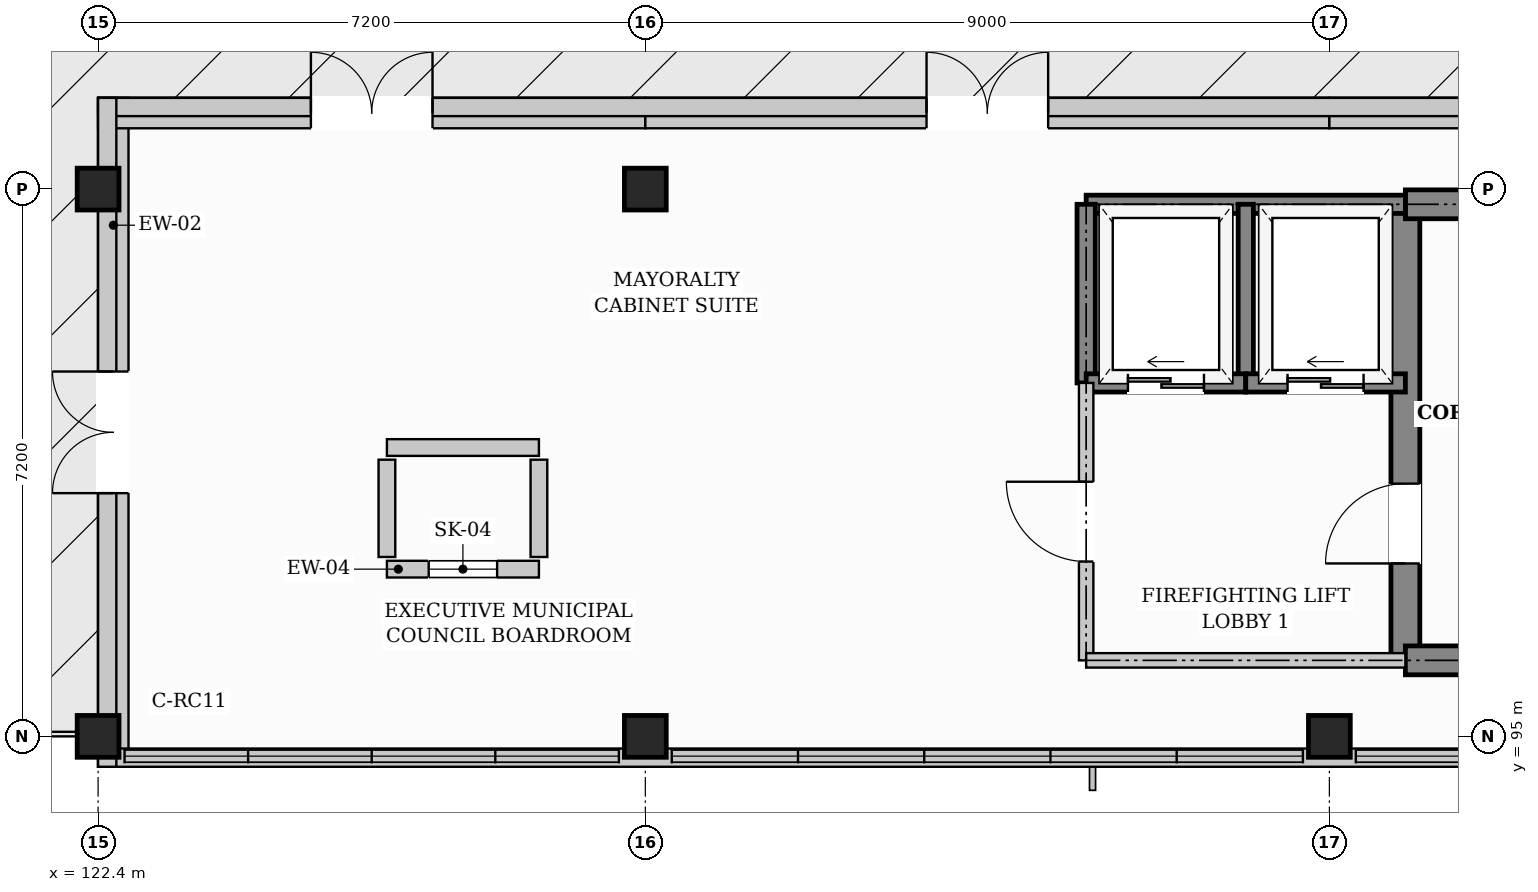
"""IFC4 building model, lengths in metres.
Left out: names, types, materials, properties, quantities, classifications, styles, units other than length and angle.
Written with IfcOpenShell. Run it as: python <this file> out.ifc"""

import sys

from ifc_helpers import new_model, si_unit, direction, frame, frame_2d, origin, origin_2d, place, context, subcontext, project, spatial, rectangle, extrude, element, fill, save


model = new_model("IFC4")
c1 = context("Model", 3, precision=1e-05, world=origin(), true_north=direction((0.0, 1.0)))
c2 = subcontext(c1, "Body", "Model", "MODEL_VIEW")
j1 = project(units=[si_unit("LENGTHUNIT", "METRE"), si_unit("PLANEANGLEUNIT", "RADIAN")], contexts=[c1])
p1 = place(None, origin())
s1 = spatial("IfcSite", under=j1, at=p1, CompositionType="ELEMENT")
p2 = place(p1, origin())
s2 = spatial("IfcBuilding", under=s1, at=p2, CompositionType="ELEMENT")
p3 = place(p2, frame((0.0, 0.0, 27.6)))
s3 = spatial("IfcBuildingStorey", under=s2, at=p3, CompositionType="ELEMENT", Elevation=27.6)
for number, where, z_axis, x_axis in (
    (1, (122.4, 95.0, 0.0), (0.0, 0.0, 1.0), (1.0, 0.0, 0.0)),
    (2, (122.4, 102.2, 0.0), (0.0, 0.0, 1.0), (1.0, 0.0, 0.0)),
    (3, (129.6, 95.0, 0.0), (0.0, 0.0, 1.0), (1.0, 0.0, 0.0)),
    (4, (129.6, 102.2, 0.0), (0.0, 0.0, 1.0), (1.0, 0.0, 0.0)),
    (5, (138.6, 95.0, 0.0), (0.0, 0.0, 1.0), (1.0, 0.0, 0.0)),
):
    element("IfcColumn", number, at=place(p3, frame(where, z_axis=z_axis, x_axis=x_axis)), inside=s3, PredefinedType="COLUMN", context=c2, shape_type="SweptSolid", body=[
        extrude(rectangle(XDim=0.55, YDim=0.55, at=origin_2d()), origin(), (0.0, 0.0, 1.0), 3.6),
    ])
p4 = place(p3, frame((122.6, 94.6, 0.0), z_axis=(0.0, 0.0, 1.0), x_axis=(0.0, 1.0, 0.0)))
e6 = element("IfcWall", 6, at=p4, inside=s3, PredefinedType="SOLIDWALL", context=c2, shape_type="SweptSolid", body=[
    extrude(rectangle(XDim=8.8, YDim=0.4, at=frame_2d((4.4, 0.0))), origin(), (0.0, 0.0, 1.0), 2.78),
])
p5 = place(p4, frame((3.6, 0.0, 0.0)))
e7 = element("IfcOpeningElement", 7, at=p5, cuts=e6, PredefinedType="OPENING", context=c2, shape_type="SweptSolid", body=[
    extrude(rectangle(XDim=1.6, YDim=2.25, at=frame_2d((0.8, 1.125))), frame((0.0, 0.21, 0.0), z_axis=(0.0, -1.0, 0.0), x_axis=(1.0, 0.0, 0.0)), (0.0, 0.0, 1.0), 0.42),
])
p6 = place(p3, frame((122.4, 103.2, 0.0), z_axis=(0.0, 0.0, 1.0), x_axis=(1.0, 0.0, 0.0)))
e8 = element("IfcWall", 8, at=p6, inside=s3, PredefinedType="SOLIDWALL", context=c2, shape_type="SweptSolid", body=[
    extrude(rectangle(XDim=7.2, YDim=0.4, at=frame_2d((3.6, 0.0))), origin(), (0.0, 0.0, 1.0), 3.34),
])
p7 = place(p6, frame((2.8, 0.0, 0.0)))
e9 = element("IfcOpeningElement", 9, at=p7, cuts=e8, PredefinedType="OPENING", context=c2, shape_type="SweptSolid", body=[
    extrude(rectangle(XDim=1.6, YDim=2.25, at=frame_2d((0.8, 1.125))), frame((0.0, 0.21, 0.0), z_axis=(0.0, -1.0, 0.0), x_axis=(1.0, 0.0, 0.0)), (0.0, 0.0, 1.0), 0.42),
])
p8 = place(p3, frame((129.6, 103.2, 0.0), z_axis=(0.0, 0.0, 1.0), x_axis=(1.0, 0.0, 0.0)))
e10 = element("IfcWall", 10, at=p8, inside=s3, PredefinedType="SOLIDWALL", context=c2, shape_type="SweptSolid", body=[
    extrude(rectangle(XDim=9.0, YDim=0.4, at=frame_2d((4.5, 0.0))), origin(), (0.0, 0.0, 1.0), 3.34),
])
p9 = place(p8, frame((3.7, 0.0, 0.0)))
e11 = element("IfcOpeningElement", 11, at=p9, cuts=e10, PredefinedType="OPENING", context=c2, shape_type="SweptSolid", body=[
    extrude(rectangle(XDim=1.6, YDim=2.25, at=frame_2d((0.8, 1.125))), frame((0.0, 0.21, 0.0), z_axis=(0.0, -1.0, 0.0), x_axis=(1.0, 0.0, 0.0)), (0.0, 0.0, 1.0), 0.42),
])
p10 = place(p3, frame((138.6, 103.2, 0.0), z_axis=(0.0, 0.0, 1.0), x_axis=(1.0, 0.0, 0.0)))
e12 = element("IfcWall", 12, at=p10, inside=s3, PredefinedType="SOLIDWALL", context=c2, shape_type="SweptSolid", body=[
    extrude(rectangle(XDim=9.0, YDim=0.4, at=frame_2d((4.5, 0.0))), origin(), (0.0, 0.0, 1.0), 3.34),
])
p11 = place(p10, frame((3.7, 0.0, 0.0)))
e13 = element("IfcOpeningElement", 13, at=p11, cuts=e12, PredefinedType="OPENING", context=c2, shape_type="SweptSolid", body=[
    extrude(rectangle(XDim=1.6, YDim=2.25, at=frame_2d((0.8, 1.125))), frame((0.0, 0.21, 0.0), z_axis=(0.0, -1.0, 0.0), x_axis=(1.0, 0.0, 0.0)), (0.0, 0.0, 1.0), 0.42),
])
p12 = place(p3, frame((122.4, 94.72, 3.6), z_axis=(0.0, 0.0, 1.0), x_axis=(1.0, 0.0, 0.0)))
e14 = element("IfcWall", 14, at=p12, inside=s3, PredefinedType="PARAPET", context=c2, shape_type="SweptSolid", body=[
    extrude(rectangle(XDim=25.6, YDim=0.24, at=frame_2d((12.8, 0.0))), origin(), (0.0, 0.0, 1.0), 1.15),
])
p13 = place(p3, frame((154.8, 103.28, 3.6), z_axis=(0.0, 0.0, 1.0), x_axis=(-1.0, 0.0, 0.0)))
e15 = element("IfcWall", 15, at=p13, inside=s3, PredefinedType="PARAPET", context=c2, shape_type="SweptSolid", body=[
    extrude(rectangle(XDim=32.4, YDim=0.24, at=frame_2d((16.2, 0.0))), origin(), (0.0, 0.0, 1.0), 1.15),
])
p14 = place(p3, frame((122.52, 103.4, 3.6), z_axis=(0.0, 0.0, 1.0), x_axis=(0.0, -1.0, 0.0)))
e16 = element("IfcWall", 16, at=p14, inside=s3, PredefinedType="PARAPET", context=c2, shape_type="SweptSolid", body=[
    extrude(rectangle(XDim=8.8, YDim=0.24, at=frame_2d((4.4, 0.0))), origin(), (0.0, 0.0, 1.0), 1.15),
])
p15 = place(p3, frame((126.2, 97.2, 3.58), z_axis=(0.0, 0.0, 1.0), x_axis=(1.0, 0.0, 0.0)))
e17 = element("IfcWall", 17, at=p15, inside=s3, PredefinedType="SOLIDWALL", context=c2, shape_type="SweptSolid", body=[
    extrude(rectangle(XDim=2.0, YDim=0.22, at=frame_2d((1.0, 0.0))), origin(), (0.0, 0.0, 1.0), 1.18),
])
p16 = place(p15, frame((0.55, 0.0, 0.28)))
e18 = element("IfcOpeningElement", 18, at=p16, cuts=e17, PredefinedType="OPENING", context=c2, shape_type="SweptSolid", body=[
    extrude(rectangle(XDim=0.9, YDim=0.65, at=frame_2d((0.45, 0.325))), frame((0.0, 0.12, 0.0), z_axis=(0.0, -1.0, 0.0), x_axis=(1.0, 0.0, 0.0)), (0.0, 0.0, 1.0), 0.24),
])
p17 = place(p3, frame((126.2, 98.8, 3.58), z_axis=(0.0, 0.0, 1.0), x_axis=(1.0, 0.0, 0.0)))
e19 = element("IfcWall", 19, at=p17, inside=s3, PredefinedType="SOLIDWALL", context=c2, shape_type="SweptSolid", body=[
    extrude(rectangle(XDim=2.0, YDim=0.22, at=frame_2d((1.0, 0.0))), origin(), (0.0, 0.0, 1.0), 1.18),
])
for number, where, z_axis, x_axis in (
    (20, (126.2, 97.36, 3.58), (0.0, 0.0, 1.0), (0.0, 1.0, 0.0)),
    (21, (128.2, 97.36, 3.58), (0.0, 0.0, 1.0), (0.0, 1.0, 0.0)),
):
    element("IfcWall", number, at=place(p3, frame(where, z_axis=z_axis, x_axis=x_axis)), inside=s3, PredefinedType="SOLIDWALL", context=c2, shape_type="SweptSolid", body=[
        extrude(rectangle(XDim=1.28, YDim=0.22, at=frame_2d((0.64, 0.0))), origin(), (0.0, 0.0, 1.0), 1.18),
    ])
p18 = place(p3, frame((139.6, 96.0, 0.0), z_axis=(0.0, 0.0, 1.0), x_axis=(0.0, 1.0, 0.0)))
e22 = element("IfcWall", 22, at=p18, inside=s3, PredefinedType="SHEAR", context=c2, shape_type="SweptSolid", body=[
    extrude(rectangle(XDim=6.0, YDim=0.38, at=frame_2d((3.0, 0.0))), origin(), (0.0, 0.0, 1.0), 3.34),
])
p19 = place(p18, frame((1.275, 0.0, 0.0)))
e23 = element("IfcOpeningElement", 23, at=p19, cuts=e22, PredefinedType="OPENING", context=c2, shape_type="SweptSolid", body=[
    extrude(rectangle(XDim=1.05, YDim=2.15, at=frame_2d((0.525, 1.075))), frame((0.0, 0.2, 0.0), z_axis=(0.0, -1.0, 0.0), x_axis=(1.0, 0.0, 0.0)), (0.0, 0.0, 1.0), 0.4),
])
for number, where, z_axis, x_axis in (
    (24, (139.6, 96.0, 0.0), (0.0, 0.0, 1.0), (1.0, 0.0, 0.0)),
    (25, (139.6, 102.0, 0.0), (0.0, 0.0, 1.0), (1.0, 0.0, 0.0)),
):
    element("IfcWall", number, at=place(p3, frame(where, z_axis=z_axis, x_axis=x_axis)), inside=s3, PredefinedType="SHEAR", context=c2, shape_type="SweptSolid", body=[
        extrude(rectangle(XDim=7.0, YDim=0.38, at=frame_2d((3.5, 0.0))), origin(), (0.0, 0.0, 1.0), 3.34),
    ])
p20 = place(p3, frame((135.4, 102.0, 0.0), z_axis=(0.0, 0.0, 1.0), x_axis=(1.0, 0.0, 0.0)))
e26 = element("IfcWall", 26, at=p20, inside=s3, PredefinedType="SHEAR", context=c2, shape_type="SweptSolid", body=[
    extrude(rectangle(XDim=4.2, YDim=0.24, at=frame_2d((2.1, 0.0))), origin(), (0.0, 0.0, 1.0), 3.34),
])
p21 = place(p3, frame((135.4, 99.65, 0.0), z_axis=(0.0, 0.0, 1.0), x_axis=(0.0, 1.0, 0.0)))
e27 = element("IfcWall", 27, at=p21, inside=s3, PredefinedType="SHEAR", context=c2, shape_type="SweptSolid", body=[
    extrude(rectangle(XDim=2.35, YDim=0.24, at=frame_2d((1.175, 0.0))), origin(), (0.0, 0.0, 1.0), 3.34),
])
p22 = place(p3, frame((137.5, 99.65, 0.0), z_axis=(0.0, 0.0, 1.0), x_axis=(0.0, 1.0, 0.0)))
e28 = element("IfcWall", 28, at=p22, inside=s3, PredefinedType="SHEAR", context=c2, shape_type="SweptSolid", body=[
    extrude(rectangle(XDim=2.35, YDim=0.2, at=frame_2d((1.175, 0.0))), origin(), (0.0, 0.0, 1.0), 3.34),
])
p23 = place(p3, frame((135.4, 99.65, 0.0), z_axis=(0.0, 0.0, 1.0), x_axis=(1.0, 0.0, 0.0)))
e29 = element("IfcWall", 29, at=p23, inside=s3, PredefinedType="SHEAR", context=c2, shape_type="SweptSolid", body=[
    extrude(rectangle(XDim=2.1, YDim=0.24, at=frame_2d((1.05, 0.0))), origin(), (0.0, 0.0, 1.0), 3.34),
])
p24 = place(p23, frame((0.55, 0.0, 0.0)))
e30 = element("IfcOpeningElement", 30, at=p24, cuts=e29, PredefinedType="OPENING", context=c2, shape_type="SweptSolid", body=[
    extrude(rectangle(XDim=1.0, YDim=2.1, at=frame_2d((0.5, 1.05))), frame((0.0, 0.13, 0.0), z_axis=(0.0, -1.0, 0.0), x_axis=(1.0, 0.0, 0.0)), (0.0, 0.0, 1.0), 0.26),
])
p25 = place(p3, frame((137.5, 99.65, 0.0), z_axis=(0.0, 0.0, 1.0), x_axis=(1.0, 0.0, 0.0)))
e31 = element("IfcWall", 31, at=p25, inside=s3, PredefinedType="SHEAR", context=c2, shape_type="SweptSolid", body=[
    extrude(rectangle(XDim=2.1, YDim=0.24, at=frame_2d((1.05, 0.0))), origin(), (0.0, 0.0, 1.0), 3.34),
])
p26 = place(p25, frame((0.55, 0.0, 0.0)))
e32 = element("IfcOpeningElement", 32, at=p26, cuts=e31, PredefinedType="OPENING", context=c2, shape_type="SweptSolid", body=[
    extrude(rectangle(XDim=1.0, YDim=2.1, at=frame_2d((0.5, 1.05))), frame((0.0, 0.13, 0.0), z_axis=(0.0, -1.0, 0.0), x_axis=(1.0, 0.0, 0.0)), (0.0, 0.0, 1.0), 0.26),
])
p27 = place(p3, frame((135.4, 96.0, 0.0), z_axis=(0.0, 0.0, 1.0), x_axis=(0.0, 1.0, 0.0)))
e33 = element("IfcWall", 33, at=p27, inside=s3, PredefinedType="PARTITIONING", context=c2, shape_type="SweptSolid", body=[
    extrude(rectangle(XDim=3.65, YDim=0.19, at=frame_2d((1.825, 0.0))), origin(), (0.0, 0.0, 1.0), 3.34),
])
p28 = place(p27, frame((1.3, 0.0, 0.0)))
e34 = element("IfcOpeningElement", 34, at=p28, cuts=e33, PredefinedType="OPENING", context=c2, shape_type="SweptSolid", body=[
    extrude(rectangle(XDim=1.05, YDim=2.15, at=frame_2d((0.525, 1.075))), frame((0.0, 0.105, 0.0), z_axis=(0.0, -1.0, 0.0), x_axis=(1.0, 0.0, 0.0)), (0.0, 0.0, 1.0), 0.21),
])
p29 = place(p3, frame((135.4, 96.0, 0.0), z_axis=(0.0, 0.0, 1.0), x_axis=(1.0, 0.0, 0.0)))
e35 = element("IfcWall", 35, at=p29, inside=s3, PredefinedType="PARTITIONING", context=c2, shape_type="SweptSolid", body=[
    extrude(rectangle(XDim=4.2, YDim=0.19, at=frame_2d((2.1, 0.0))), origin(), (0.0, 0.0, 1.0), 3.34),
])
p30 = place(p5, origin())
e36 = element("IfcDoor", 36, at=p30, inside=s3, OperationType="DOUBLE_DOOR_SINGLE_SWING", PredefinedType="DOOR", context=c2, shape_type="SweptSolid", body=[
    extrude(rectangle(XDim=1.6, YDim=2.25, at=frame_2d((0.8, 1.125))), frame((0.0, 0.025, 0.0), z_axis=(0.0, -1.0, 0.0), x_axis=(1.0, 0.0, 0.0)), (0.0, 0.0, 1.0), 0.05),
])
fill(e7, e36)
p31 = place(p7, origin())
e37 = element("IfcDoor", 37, at=p31, inside=s3, OperationType="DOUBLE_DOOR_SINGLE_SWING", PredefinedType="DOOR", context=c2, shape_type="SweptSolid", body=[
    extrude(rectangle(XDim=1.6, YDim=2.25, at=frame_2d((0.8, 1.125))), frame((0.0, 0.025, 0.0), z_axis=(0.0, -1.0, 0.0), x_axis=(1.0, 0.0, 0.0)), (0.0, 0.0, 1.0), 0.05),
])
fill(e9, e37)
p32 = place(p9, origin())
e38 = element("IfcDoor", 38, at=p32, inside=s3, OperationType="DOUBLE_DOOR_SINGLE_SWING", PredefinedType="DOOR", context=c2, shape_type="SweptSolid", body=[
    extrude(rectangle(XDim=1.6, YDim=2.25, at=frame_2d((0.8, 1.125))), frame((0.0, 0.025, 0.0), z_axis=(0.0, -1.0, 0.0), x_axis=(1.0, 0.0, 0.0)), (0.0, 0.0, 1.0), 0.05),
])
fill(e11, e38)
p33 = place(p16, origin())
e39 = element("IfcWindow", 39, at=p33, inside=s3, PartitioningType="SINGLE_PANEL", PredefinedType="SKYLIGHT", context=c2, shape_type="SweptSolid", body=[
    extrude(rectangle(XDim=0.9, YDim=0.65, at=frame_2d((0.45, 0.325))), frame((0.0, 0.03, 0.0), z_axis=(0.0, -1.0, 0.0), x_axis=(1.0, 0.0, 0.0)), (0.0, 0.0, 1.0), 0.06),
])
fill(e18, e39)
p34 = place(p19, origin())
e40 = element("IfcDoor", 40, at=p34, inside=s3, OperationType="SINGLE_SWING_LEFT", PredefinedType="DOOR", context=c2, shape_type="SweptSolid", body=[
    extrude(rectangle(XDim=1.05, YDim=2.15, at=frame_2d((0.525, 1.075))), frame((0.0, 0.025, 0.0), z_axis=(0.0, -1.0, 0.0), x_axis=(1.0, 0.0, 0.0)), (0.0, 0.0, 1.0), 0.05),
])
fill(e23, e40)
p35 = place(p24, origin())
e41 = element("IfcDoor", 41, at=p35, inside=s3, OperationType="SLIDING_TO_LEFT", PredefinedType="DOOR", context=c2, shape_type="SweptSolid", body=[
    extrude(rectangle(XDim=1.0, YDim=2.1, at=frame_2d((0.5, 1.05))), frame((0.0, 0.025, 0.0), z_axis=(0.0, -1.0, 0.0), x_axis=(1.0, 0.0, 0.0)), (0.0, 0.0, 1.0), 0.05),
])
fill(e30, e41)
p36 = place(p26, origin())
e42 = element("IfcDoor", 42, at=p36, inside=s3, OperationType="SLIDING_TO_LEFT", PredefinedType="DOOR", context=c2, shape_type="SweptSolid", body=[
    extrude(rectangle(XDim=1.0, YDim=2.1, at=frame_2d((0.5, 1.05))), frame((0.0, 0.025, 0.0), z_axis=(0.0, -1.0, 0.0), x_axis=(1.0, 0.0, 0.0)), (0.0, 0.0, 1.0), 0.05),
])
fill(e32, e42)
p37 = place(p28, origin())
e43 = element("IfcDoor", 43, at=p37, inside=s3, OperationType="SINGLE_SWING_RIGHT", PredefinedType="DOOR", context=c2, shape_type="SweptSolid", body=[
    extrude(rectangle(XDim=1.05, YDim=2.15, at=frame_2d((0.525, 1.075))), frame((0.0, 0.025, 0.0), z_axis=(0.0, -1.0, 0.0), x_axis=(1.0, 0.0, 0.0)), (0.0, 0.0, 1.0), 0.05),
])
fill(e34, e43)
save(model, sys.argv[1])
